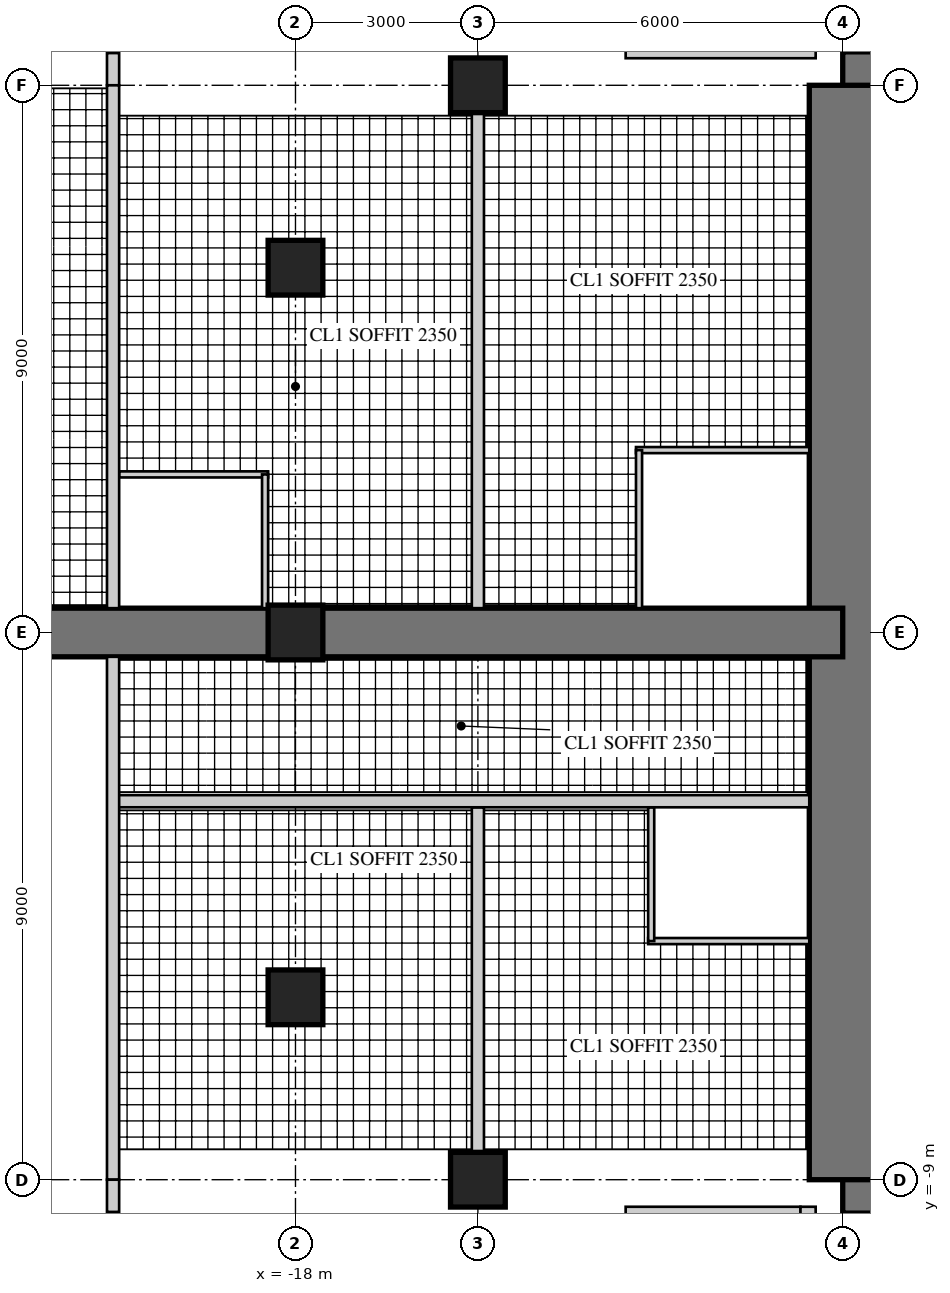
"""IFC4 building model, lengths in metres.
Left out: names, types, materials, properties, quantities, classifications, styles, units other than length and angle.
Written with IfcOpenShell. Run it as: python <this file> out.ifc"""

import sys

from ifc_helpers import new_model, si_unit, direction, frame, frame_2d, origin, origin_2d, place, context, subcontext, project, spatial, rectangle, hollow_rectangle, extrude, element, fill, save


model = new_model("IFC4")
c1 = context("Model", 3, precision=1e-05, world=origin(), true_north=direction((0.0, 1.0)))
c2 = subcontext(c1, "Body", "Model", "MODEL_VIEW")
j1 = project(units=[si_unit("LENGTHUNIT", "METRE"), si_unit("PLANEANGLEUNIT", "RADIAN")], contexts=[c1])
p1 = place(None, origin())
s1 = spatial("IfcSite", under=j1, at=p1, CompositionType="ELEMENT")
p2 = place(p1, origin())
s2 = spatial("IfcBuilding", under=s1, at=p2, CompositionType="ELEMENT")
p3 = place(p2, frame((0.0, 0.0, 206.9)))
s3 = spatial("IfcBuildingStorey", under=s2, at=p3, CompositionType="ELEMENT", Elevation=206.9)
p4 = place(p3, frame((9.0, 9.0, 0.0), z_axis=(0.0, 0.0, 1.0), x_axis=(-1.0, 0.0, 0.0)))
e1 = element("IfcWall", 1, at=p4, inside=s3, PredefinedType="SHEAR", context=c2, shape_type="SweptSolid", body=[
    extrude(rectangle(XDim=18.0, YDim=1.1, at=frame_2d((9.0, 0.0))), origin(), (0.0, 0.0, 1.0), 3.4),
])
p5 = place(p4, frame((9.8, 0.0, 0.0)))
e2 = element("IfcOpeningElement", 2, at=p5, cuts=e1, PredefinedType="OPENING", context=c2, shape_type="SweptSolid", body=[
    extrude(rectangle(XDim=1.0, YDim=2.4, at=frame_2d((0.5, 1.2))), frame((0.0, 0.56, 0.0), z_axis=(0.0, -1.0, 0.0), x_axis=(1.0, 0.0, 0.0)), (0.0, 0.0, 1.0), 1.12),
])
p6 = place(p3, frame((-9.0, -9.0, 0.0), z_axis=(0.0, 0.0, 1.0), x_axis=(1.0, 0.0, 0.0)))
e3 = element("IfcWall", 3, at=p6, inside=s3, PredefinedType="SHEAR", context=c2, shape_type="SweptSolid", body=[
    extrude(rectangle(XDim=18.0, YDim=1.1, at=frame_2d((9.0, 0.0))), origin(), (0.0, 0.0, 1.0), 3.4),
])
p7 = place(p6, frame((9.8, 0.0, 0.0)))
e4 = element("IfcOpeningElement", 4, at=p7, cuts=e3, PredefinedType="OPENING", context=c2, shape_type="SweptSolid", body=[
    extrude(rectangle(XDim=1.0, YDim=2.4, at=frame_2d((0.5, 1.2))), frame((0.0, 0.56, 0.0), z_axis=(0.0, -1.0, 0.0), x_axis=(1.0, 0.0, 0.0)), (0.0, 0.0, 1.0), 1.12),
])
p8 = place(p3, frame((-9.0, 9.0, 0.0), z_axis=(0.0, 0.0, 1.0), x_axis=(0.0, -1.0, 0.0)))
e5 = element("IfcWall", 5, at=p8, inside=s3, PredefinedType="SHEAR", context=c2, shape_type="SweptSolid", body=[
    extrude(rectangle(XDim=18.0, YDim=1.1, at=frame_2d((9.0, 0.0))), origin(), (0.0, 0.0, 1.0), 3.4),
])
p9 = place(p8, frame((9.8, 0.0, 0.0)))
e6 = element("IfcOpeningElement", 6, at=p9, cuts=e5, PredefinedType="OPENING", context=c2, shape_type="SweptSolid", body=[
    extrude(rectangle(XDim=1.0, YDim=2.4, at=frame_2d((0.5, 1.2))), frame((0.0, 0.56, 0.0), z_axis=(0.0, -1.0, 0.0), x_axis=(1.0, 0.0, 0.0)), (0.0, 0.0, 1.0), 1.12),
])
p10 = place(p3, frame((-9.0, 0.0, 0.0), z_axis=(0.0, 0.0, 1.0), x_axis=(-1.0, 0.0, 0.0)))
e7 = element("IfcWall", 7, at=p10, inside=s3, PredefinedType="SHEAR", context=c2, shape_type="SweptSolid", body=[
    extrude(rectangle(XDim=18.0, YDim=0.8, at=frame_2d((9.0, 0.0))), origin(), (0.0, 0.0, 1.0), 3.4),
])
p11 = place(p10, frame((3.95, 0.0, 0.0)))
e8 = element("IfcOpeningElement", 8, at=p11, cuts=e7, PredefinedType="OPENING", context=c2, shape_type="SweptSolid", body=[
    extrude(rectangle(XDim=1.0, YDim=2.15, at=frame_2d((0.5, 1.075))), frame((0.0, 0.41, 0.0), z_axis=(0.0, -1.0, 0.0), x_axis=(1.0, 0.0, 0.0)), (0.0, 0.0, 1.0), 0.82),
])
p12 = place(p10, frame((6.6, 0.0, 0.0)))
e9 = element("IfcOpeningElement", 9, at=p12, cuts=e7, PredefinedType="OPENING", context=c2, shape_type="SweptSolid", body=[
    extrude(rectangle(XDim=1.0, YDim=2.15, at=frame_2d((0.5, 1.075))), frame((0.0, 0.41, 0.0), z_axis=(0.0, -1.0, 0.0), x_axis=(1.0, 0.0, 0.0)), (0.0, 0.0, 1.0), 0.82),
])
p13 = place(p10, frame((13.25, 0.0, 0.0)))
e10 = element("IfcOpeningElement", 10, at=p13, cuts=e7, PredefinedType="OPENING", context=c2, shape_type="SweptSolid", body=[
    extrude(rectangle(XDim=1.0, YDim=2.2, at=frame_2d((0.5, 1.1))), frame((0.0, 0.41, 0.0), z_axis=(0.0, -1.0, 0.0), x_axis=(1.0, 0.0, 0.0)), (0.0, 0.0, 1.0), 0.82),
])
for number, where, z_axis, x_axis in (
    (11, (-15.0, 9.0, 0.0), (0.0, 0.0, 1.0), (1.0, 0.0, 0.0)),
    (12, (-15.0, -9.0, 0.0), (0.0, 0.0, 1.0), (1.0, 0.0, 0.0)),
    (13, (-18.0, 6.0, 0.0), (0.0, 0.0, 1.0), (1.0, 0.0, 0.0)),
    (14, (-18.0, 0.0, 0.0), (0.0, 0.0, 1.0), (1.0, 0.0, 0.0)),
    (15, (-18.0, -6.0, 0.0), (0.0, 0.0, 1.0), (1.0, 0.0, 0.0)),
):
    element("IfcColumn", number, at=place(p3, frame(where, z_axis=z_axis, x_axis=x_axis)), inside=s3, PredefinedType="COLUMN", context=c2, shape_type="SweptSolid", body=[
        extrude(rectangle(XDim=0.9, YDim=0.9, at=origin_2d()), origin(), (0.0, 0.0, 1.0), 3.4),
    ])
p14 = place(p3, frame((-9.445, 9.57, 0.0), z_axis=(0.0, 0.0, 1.0), x_axis=(-1.0, 0.0, 0.0)))
e16 = element("IfcWall", 16, at=p14, inside=s3, PredefinedType="SOLIDWALL", context=c2, shape_type="SweptSolid", body=[
    extrude(rectangle(XDim=3.125, YDim=0.25, at=frame_2d((1.562, 0.0))), origin(), (0.0, 0.0, 1.0), 3.22),
])
p15 = place(p14, frame((0.6, 0.0, 0.0)))
e17 = element("IfcOpeningElement", 17, at=p15, cuts=e16, PredefinedType="OPENING", context=c2, shape_type="SweptSolid", body=[
    extrude(rectangle(XDim=1.0, YDim=2.2, at=frame_2d((0.5, 1.1))), frame((0.0, 0.135, 0.0), z_axis=(0.0, -1.0, 0.0), x_axis=(1.0, 0.0, 0.0)), (0.0, 0.0, 1.0), 0.27),
])
p16 = place(p3, frame((-12.57, -9.57, 0.0), z_axis=(0.0, 0.0, 1.0), x_axis=(1.0, 0.0, 0.0)))
e18 = element("IfcWall", 18, at=p16, inside=s3, PredefinedType="SOLIDWALL", context=c2, shape_type="SweptSolid", body=[
    extrude(rectangle(XDim=2.875, YDim=0.25, at=frame_2d((1.438, 0.0))), origin(), (0.0, 0.0, 1.0), 3.22),
])
p17 = place(p16, frame((0.6, 0.0, 0.0)))
e19 = element("IfcOpeningElement", 19, at=p17, cuts=e18, PredefinedType="OPENING", context=c2, shape_type="SweptSolid", body=[
    extrude(rectangle(XDim=1.0, YDim=2.2, at=frame_2d((0.5, 1.1))), frame((0.0, 0.135, 0.0), z_axis=(0.0, -1.0, 0.0), x_axis=(1.0, 0.0, 0.0)), (0.0, 0.0, 1.0), 0.27),
])
p18 = place(p3, frame((-9.57, -9.445, 0.0), z_axis=(0.0, 0.0, 1.0), x_axis=(0.0, -1.0, 0.0)))
e20 = element("IfcWall", 20, at=p18, inside=s3, PredefinedType="SOLIDWALL", context=c2, shape_type="SweptSolid", body=[
    extrude(rectangle(XDim=3.125, YDim=0.25, at=frame_2d((1.562, 0.0))), origin(), (0.0, 0.0, 1.0), 3.22),
])
p19 = place(p18, frame((0.6, 0.0, 0.0)))
e21 = element("IfcOpeningElement", 21, at=p19, cuts=e20, PredefinedType="OPENING", context=c2, shape_type="SweptSolid", body=[
    extrude(rectangle(XDim=1.0, YDim=2.2, at=frame_2d((0.5, 1.1))), frame((0.0, 0.135, 0.0), z_axis=(0.0, -1.0, 0.0), x_axis=(1.0, 0.0, 0.0)), (0.0, 0.0, 1.0), 0.27),
])
p20 = place(p3, frame((-9.55, -5.075, 0.0), z_axis=(0.0, 0.0, 1.0), x_axis=(-1.0, 0.0, 0.0)))
e22 = element("IfcWall", 22, at=p20, inside=s3, PredefinedType="PARTITIONING", context=c2, shape_type="SweptSolid", body=[
    extrude(rectangle(XDim=2.65, YDim=0.1, at=frame_2d((1.325, 0.0))), origin(), (0.0, 0.0, 1.0), 3.22),
])
p21 = place(p3, frame((-12.15, -2.875, 0.0), z_axis=(0.0, 0.0, 1.0), x_axis=(0.0, -1.0, 0.0)))
e23 = element("IfcWall", 23, at=p21, inside=s3, PredefinedType="PARTITIONING", context=c2, shape_type="SweptSolid", body=[
    extrude(rectangle(XDim=2.2, YDim=0.1, at=frame_2d((1.1, 0.0))), origin(), (0.0, 0.0, 1.0), 3.22),
])
p22 = place(p21, frame((0.55, 0.0, 0.0)))
e24 = element("IfcOpeningElement", 24, at=p22, cuts=e23, PredefinedType="OPENING", context=c2, shape_type="SweptSolid", body=[
    extrude(rectangle(XDim=0.9, YDim=2.1, at=frame_2d((0.45, 1.05))), frame((0.0, 0.06, 0.0), z_axis=(0.0, -1.0, 0.0), x_axis=(1.0, 0.0, 0.0)), (0.0, 0.0, 1.0), 0.12),
])
p23 = place(p3, frame((-9.55, 3.0, 0.0), z_axis=(0.0, 0.0, 1.0), x_axis=(-1.0, 0.0, 0.0)))
e25 = element("IfcWall", 25, at=p23, inside=s3, PredefinedType="PARTITIONING", context=c2, shape_type="SweptSolid", body=[
    extrude(rectangle(XDim=2.85, YDim=0.1, at=frame_2d((1.425, 0.0))), origin(), (0.0, 0.0, 1.0), 3.22),
])
p24 = place(p3, frame((-12.35, 3.0, 0.0), z_axis=(0.0, 0.0, 1.0), x_axis=(0.0, -1.0, 0.0)))
e26 = element("IfcWall", 26, at=p24, inside=s3, PredefinedType="PARTITIONING", context=c2, shape_type="SweptSolid", body=[
    extrude(rectangle(XDim=2.6, YDim=0.1, at=frame_2d((1.3, 0.0))), origin(), (0.0, 0.0, 1.0), 3.22),
])
p25 = place(p24, frame((0.55, 0.0, 0.0)))
e27 = element("IfcOpeningElement", 27, at=p25, cuts=e26, PredefinedType="OPENING", context=c2, shape_type="SweptSolid", body=[
    extrude(rectangle(XDim=0.9, YDim=2.1, at=frame_2d((0.45, 1.05))), frame((0.0, 0.06, 0.0), z_axis=(0.0, -1.0, 0.0), x_axis=(1.0, 0.0, 0.0)), (0.0, 0.0, 1.0), 0.12),
])
p26 = place(p3, frame((-15.0, -2.875, 0.0), z_axis=(0.0, 0.0, 1.0), x_axis=(0.0, -1.0, 0.0)))
e28 = element("IfcWall", 28, at=p26, inside=s3, PredefinedType="SOLIDWALL", context=c2, shape_type="SweptSolid", body=[
    extrude(rectangle(XDim=5.675, YDim=0.2, at=frame_2d((2.837, 0.0))), origin(), (0.0, 0.0, 1.0), 2.47),
])
p27 = place(p3, frame((-15.0, 8.55, 0.0), z_axis=(0.0, 0.0, 1.0), x_axis=(0.0, -1.0, 0.0)))
e29 = element("IfcWall", 29, at=p27, inside=s3, PredefinedType="SOLIDWALL", context=c2, shape_type="SweptSolid", body=[
    extrude(rectangle(XDim=8.15, YDim=0.2, at=frame_2d((4.075, 0.0))), origin(), (0.0, 0.0, 1.0), 2.47),
])
p28 = place(p3, frame((-18.45, 2.6, 0.0), z_axis=(0.0, 0.0, 1.0), x_axis=(-1.0, 0.0, 0.0)))
e30 = element("IfcWall", 30, at=p28, inside=s3, PredefinedType="PARTITIONING", context=c2, shape_type="SweptSolid", body=[
    extrude(rectangle(XDim=2.45, YDim=0.1, at=frame_2d((1.225, 0.0))), origin(), (0.0, 0.0, 1.0), 3.22),
])
p29 = place(p3, frame((-18.5, 2.6, 0.0), z_axis=(0.0, 0.0, 1.0), x_axis=(0.0, -1.0, 0.0)))
e31 = element("IfcWall", 31, at=p29, inside=s3, PredefinedType="PARTITIONING", context=c2, shape_type="SweptSolid", body=[
    extrude(rectangle(XDim=2.2, YDim=0.1, at=frame_2d((1.1, 0.0))), origin(), (0.0, 0.0, 1.0), 3.22),
])
p30 = place(p29, frame((0.55, 0.0, 0.0)))
e32 = element("IfcOpeningElement", 32, at=p30, cuts=e31, PredefinedType="OPENING", context=c2, shape_type="SweptSolid", body=[
    extrude(rectangle(XDim=0.9, YDim=2.1, at=frame_2d((0.45, 1.05))), frame((0.0, 0.06, 0.0), z_axis=(0.0, -1.0, 0.0), x_axis=(1.0, 0.0, 0.0)), (0.0, 0.0, 1.0), 0.12),
])
p31 = place(p3, frame((-9.55, -2.775, 0.0), z_axis=(0.0, 0.0, 1.0), x_axis=(-1.0, 0.0, 0.0)))
e33 = element("IfcWall", 33, at=p31, inside=s3, PredefinedType="SOLIDWALL", context=c2, shape_type="SweptSolid", body=[
    extrude(rectangle(XDim=11.45, YDim=0.2, at=frame_2d((5.725, 0.0))), origin(), (0.0, 0.0, 1.0), 3.22),
])
p32 = place(p31, frame((3.4, 0.0, 0.0)))
e34 = element("IfcOpeningElement", 34, at=p32, cuts=e33, PredefinedType="OPENING", context=c2, shape_type="SweptSolid", body=[
    extrude(rectangle(XDim=1.0, YDim=2.15, at=frame_2d((0.5, 1.075))), frame((0.0, 0.11, 0.0), z_axis=(0.0, -1.0, 0.0), x_axis=(1.0, 0.0, 0.0)), (0.0, 0.0, 1.0), 0.22),
])
p33 = place(p31, frame((6.65, 0.0, 0.0)))
e35 = element("IfcOpeningElement", 35, at=p33, cuts=e33, PredefinedType="OPENING", context=c2, shape_type="SweptSolid", body=[
    extrude(rectangle(XDim=1.0, YDim=2.2, at=frame_2d((0.5, 1.1))), frame((0.0, 0.11, 0.0), z_axis=(0.0, -1.0, 0.0), x_axis=(1.0, 0.0, 0.0)), (0.0, 0.0, 1.0), 0.22),
])
p34 = place(p3, frame((-21.0, 9.53, 0.0), z_axis=(0.0, 0.0, 1.0), x_axis=(0.0, -1.0, 0.0)))
e36 = element("IfcWall", 36, at=p34, inside=s3, PredefinedType="SOLIDWALL", context=c2, shape_type="SweptSolid", body=[
    extrude(rectangle(XDim=0.53, YDim=0.2, at=frame_2d((0.265, 0.0))), origin(), (0.0, 0.0, 1.0), 3.22),
])
p35 = place(p3, frame((-21.0, 9.0, 0.0), z_axis=(0.0, 0.0, 1.0), x_axis=(0.0, -1.0, 0.0)))
e37 = element("IfcWall", 37, at=p35, inside=s3, PredefinedType="SOLIDWALL", context=c2, shape_type="SweptSolid", body=[
    extrude(rectangle(XDim=8.6, YDim=0.2, at=frame_2d((4.3, 0.0))), origin(), (0.0, 0.0, 1.0), 2.62),
])
p36 = place(p3, frame((-21.0, -0.4, 0.0), z_axis=(0.0, 0.0, 1.0), x_axis=(0.0, -1.0, 0.0)))
e38 = element("IfcWall", 38, at=p36, inside=s3, PredefinedType="SOLIDWALL", context=c2, shape_type="SweptSolid", body=[
    extrude(rectangle(XDim=8.6, YDim=0.2, at=frame_2d((4.3, 0.0))), origin(), (0.0, 0.0, 1.0), 2.62),
])
p37 = place(p36, frame((0.4, 0.0, 0.0)))
e39 = element("IfcOpeningElement", 39, at=p37, cuts=e38, PredefinedType="OPENING", context=c2, shape_type="SweptSolid", body=[
    extrude(rectangle(XDim=1.0, YDim=2.2, at=frame_2d((0.5, 1.1))), frame((0.0, 0.11, 0.0), z_axis=(0.0, -1.0, 0.0), x_axis=(1.0, 0.0, 0.0)), (0.0, 0.0, 1.0), 0.22),
])
p38 = place(p3, frame((-21.0, -9.0, 0.0), z_axis=(0.0, 0.0, 1.0), x_axis=(0.0, -1.0, 0.0)))
e40 = element("IfcWall", 40, at=p38, inside=s3, PredefinedType="SOLIDWALL", context=c2, shape_type="SweptSolid", body=[
    extrude(rectangle(XDim=0.53, YDim=0.2, at=frame_2d((0.265, 0.0))), origin(), (0.0, 0.0, 1.0), 3.22),
])
p39 = place(p15, origin())
e41 = element("IfcDoor", 41, at=p39, inside=s3, OperationType="SINGLE_SWING_LEFT", PredefinedType="DOOR", context=c2, shape_type="SweptSolid", body=[
    extrude(hollow_rectangle(XDim=1.0, YDim=2.2, WallThickness=0.06, at=frame_2d((0.5, 1.1))), frame((0.0, 0.025, 0.0), z_axis=(0.0, -1.0, 0.0), x_axis=(1.0, 0.0, 0.0)), (0.0, 0.0, 1.0), 0.05),
    extrude(rectangle(XDim=0.879, YDim=2.079, at=frame_2d((0.5, 1.1))), frame((0.0, 0.025, 0.0), z_axis=(0.0, -1.0, 0.0), x_axis=(1.0, 0.0, 0.0)), (0.0, 0.0, 1.0), 0.05),
])
fill(e17, e41)
p40 = place(p17, origin())
e42 = element("IfcDoor", 42, at=p40, inside=s3, OperationType="SINGLE_SWING_RIGHT", PredefinedType="DOOR", context=c2, shape_type="SweptSolid", body=[
    extrude(hollow_rectangle(XDim=1.0, YDim=2.2, WallThickness=0.06, at=frame_2d((0.5, 1.1))), frame((0.0, 0.025, 0.0), z_axis=(0.0, -1.0, 0.0), x_axis=(1.0, 0.0, 0.0)), (0.0, 0.0, 1.0), 0.05),
    extrude(rectangle(XDim=0.879, YDim=2.079, at=frame_2d((0.5, 1.1))), frame((0.0, 0.025, 0.0), z_axis=(0.0, -1.0, 0.0), x_axis=(1.0, 0.0, 0.0)), (0.0, 0.0, 1.0), 0.05),
])
fill(e19, e42)
p41 = place(p22, origin())
e43 = element("IfcDoor", 43, at=p41, inside=s3, OperationType="SINGLE_SWING_LEFT", PredefinedType="DOOR", context=c2, shape_type="SweptSolid", body=[
    extrude(rectangle(XDim=0.9, YDim=2.1, at=frame_2d((0.45, 1.05))), frame((0.0, 0.025, 0.0), z_axis=(0.0, -1.0, 0.0), x_axis=(1.0, 0.0, 0.0)), (0.0, 0.0, 1.0), 0.05),
])
fill(e24, e43)
p42 = place(p25, origin())
e44 = element("IfcDoor", 44, at=p42, inside=s3, OperationType="SINGLE_SWING_LEFT", PredefinedType="DOOR", context=c2, shape_type="SweptSolid", body=[
    extrude(rectangle(XDim=0.9, YDim=2.1, at=frame_2d((0.45, 1.05))), frame((0.0, 0.025, 0.0), z_axis=(0.0, -1.0, 0.0), x_axis=(1.0, 0.0, 0.0)), (0.0, 0.0, 1.0), 0.05),
])
fill(e27, e44)
p43 = place(p30, frame((0.9, 0.0, 0.0), z_axis=(0.0, 0.0, 1.0), x_axis=(-1.0, 0.0, 0.0)))
e45 = element("IfcDoor", 45, at=p43, inside=s3, OperationType="SINGLE_SWING_RIGHT", PredefinedType="DOOR", context=c2, shape_type="SweptSolid", body=[
    extrude(rectangle(XDim=0.9, YDim=2.1, at=frame_2d((0.45, 1.05))), frame((0.0, 0.025, 0.0), z_axis=(0.0, -1.0, 0.0), x_axis=(1.0, 0.0, 0.0)), (0.0, 0.0, 1.0), 0.05),
])
fill(e32, e45)
p44 = place(p32, origin())
e46 = element("IfcDoor", 46, at=p44, inside=s3, OperationType="SINGLE_SWING_LEFT", PredefinedType="DOOR", context=c2, shape_type="SweptSolid", body=[
    extrude(rectangle(XDim=1.0, YDim=2.15, at=frame_2d((0.5, 1.075))), frame((0.0, 0.025, 0.0), z_axis=(0.0, -1.0, 0.0), x_axis=(1.0, 0.0, 0.0)), (0.0, 0.0, 1.0), 0.05),
])
fill(e34, e46)
p45 = place(p33, origin())
e47 = element("IfcDoor", 47, at=p45, inside=s3, OperationType="SINGLE_SWING_LEFT", PredefinedType="DOOR", context=c2, shape_type="SweptSolid", body=[
    extrude(rectangle(XDim=1.0, YDim=2.2, at=frame_2d((0.5, 1.1))), frame((0.0, 0.025, 0.0), z_axis=(0.0, -1.0, 0.0), x_axis=(1.0, 0.0, 0.0)), (0.0, 0.0, 1.0), 0.05),
])
fill(e35, e47)
p46 = place(p37, frame((1.0, 0.0, 0.0), z_axis=(0.0, 0.0, 1.0), x_axis=(-1.0, 0.0, 0.0)))
e48 = element("IfcDoor", 48, at=p46, inside=s3, OperationType="SINGLE_SWING_RIGHT", PredefinedType="DOOR", context=c2, shape_type="SweptSolid", body=[
    extrude(rectangle(XDim=1.0, YDim=2.2, at=frame_2d((0.5, 1.1))), frame((0.0, 0.025, 0.0), z_axis=(0.0, -1.0, 0.0), x_axis=(1.0, 0.0, 0.0)), (0.0, 0.0, 1.0), 0.05),
])
fill(e39, e48)
p47 = place(p11, frame((1.0, 0.0, 0.0), z_axis=(0.0, 0.0, 1.0), x_axis=(-1.0, 0.0, 0.0)))
e49 = element("IfcDoor", 49, at=p47, inside=s3, OperationType="SINGLE_SWING_RIGHT", PredefinedType="DOOR", context=c2, shape_type="SweptSolid", body=[
    extrude(rectangle(XDim=1.0, YDim=2.15, at=frame_2d((0.5, 1.075))), frame((0.0, 0.025, 0.0), z_axis=(0.0, -1.0, 0.0), x_axis=(1.0, 0.0, 0.0)), (0.0, 0.0, 1.0), 0.05),
])
fill(e8, e49)
p48 = place(p12, frame((1.0, 0.0, 0.0), z_axis=(0.0, 0.0, 1.0), x_axis=(-1.0, 0.0, 0.0)))
e50 = element("IfcDoor", 50, at=p48, inside=s3, OperationType="SINGLE_SWING_RIGHT", PredefinedType="DOOR", context=c2, shape_type="SweptSolid", body=[
    extrude(rectangle(XDim=1.0, YDim=2.15, at=frame_2d((0.5, 1.075))), frame((0.0, 0.025, 0.0), z_axis=(0.0, -1.0, 0.0), x_axis=(1.0, 0.0, 0.0)), (0.0, 0.0, 1.0), 0.05),
])
fill(e9, e50)
p49 = place(p9, origin())
e51 = element("IfcDoor", 51, at=p49, inside=s3, OperationType="SINGLE_SWING_RIGHT", PredefinedType="DOOR", context=c2, shape_type="SweptSolid", body=[
    extrude(rectangle(XDim=1.0, YDim=2.4, at=frame_2d((0.5, 1.2))), frame((0.0, 0.055, 0.0), z_axis=(0.0, -1.0, 0.0), x_axis=(1.0, 0.0, 0.0)), (0.0, 0.0, 1.0), 0.05),
])
fill(e6, e51)
save(model, sys.argv[1])
